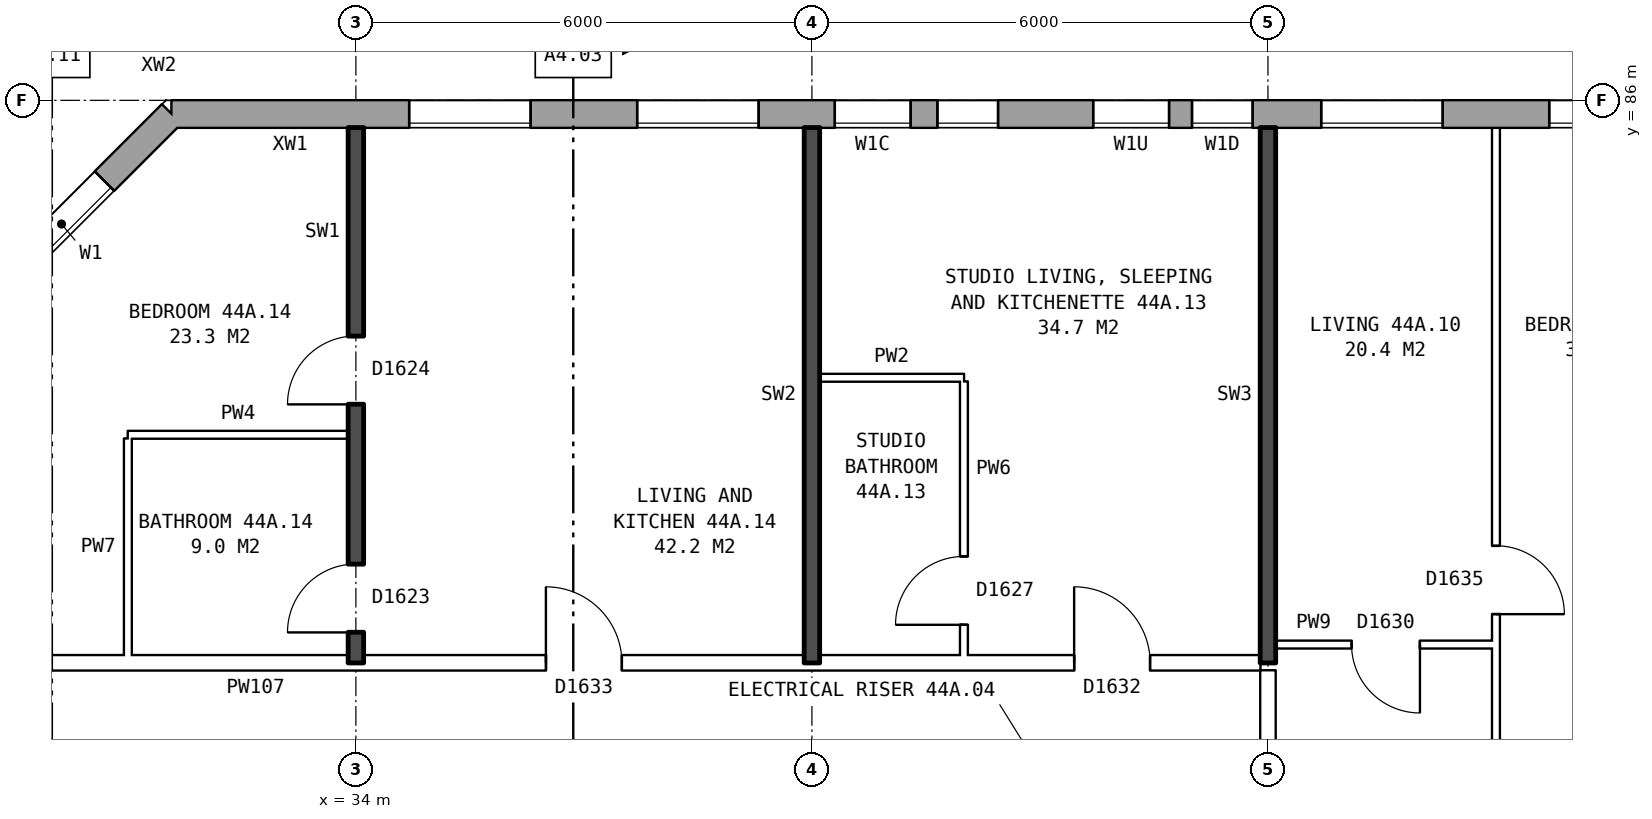
"""IFC4 building model, lengths in metres.
Left out: names, types, materials, properties, quantities, classifications, styles, units other than length and angle.
Written with IfcOpenShell. Run it as: python <this file> out.ifc"""

import sys

from ifc_helpers import new_model, si_unit, direction, frame, frame_2d, origin, place, context, subcontext, project, spatial, rectangle, extrude, element, fill, save


model = new_model("IFC4")
c1 = context("Model", 3, precision=1e-05, world=origin(), true_north=direction((0.0, 1.0)))
c2 = subcontext(c1, "Body", "Model", "MODEL_VIEW")
j1 = project(units=[si_unit("LENGTHUNIT", "METRE"), si_unit("PLANEANGLEUNIT", "RADIAN")], contexts=[c1])
p1 = place(None, origin())
s1 = spatial("IfcSite", under=j1, at=p1, CompositionType="ELEMENT")
p2 = place(p1, origin())
s2 = spatial("IfcBuilding", under=s1, at=p2, CompositionType="ELEMENT")
p3 = place(p2, frame((0.0, 0.0, 157.8)))
s3 = spatial("IfcBuildingStorey", under=s2, at=p3, CompositionType="ELEMENT", Elevation=157.8)
p4 = place(p3, frame((72.925, 85.82, 0.0), z_axis=(0.0, 0.0, 1.0), x_axis=(-1.0, 0.0, 0.0)))
e1 = element("IfcWall", 1, at=p4, inside=s3, PredefinedType="STANDARD", context=c2, shape_type="SweptSolid", body=[
    extrude(rectangle(XDim=41.351, YDim=0.36, at=frame_2d((20.675, 0.0))), origin(), (0.0, 0.0, 1.0), 2.85),
])
p5 = place(p4, frame((0.625, 0.0, 0.8)))
e2 = element("IfcOpeningElement", 2, at=p5, cuts=e1, PredefinedType="OPENING", context=c2, shape_type="SweptSolid", body=[
    extrude(rectangle(XDim=1.6, YDim=1.8, at=frame_2d((0.8, 0.9))), frame((0.0, 0.19, 0.0), z_axis=(0.0, -1.0, 0.0), x_axis=(1.0, 0.0, 0.0)), (0.0, 0.0, 1.0), 0.38),
])
p6 = place(p4, frame((3.625, 0.0, 0.8)))
e3 = element("IfcOpeningElement", 3, at=p6, cuts=e1, PredefinedType="OPENING", context=c2, shape_type="SweptSolid", body=[
    extrude(rectangle(XDim=1.6, YDim=1.8, at=frame_2d((0.8, 0.9))), frame((0.0, 0.19, 0.0), z_axis=(0.0, -1.0, 0.0), x_axis=(1.0, 0.0, 0.0)), (0.0, 0.0, 1.0), 0.38),
])
p7 = place(p4, frame((6.625, 0.0, 0.8)))
e4 = element("IfcOpeningElement", 4, at=p7, cuts=e1, PredefinedType="OPENING", context=c2, shape_type="SweptSolid", body=[
    extrude(rectangle(XDim=1.6, YDim=1.8, at=frame_2d((0.8, 0.9))), frame((0.0, 0.19, 0.0), z_axis=(0.0, -1.0, 0.0), x_axis=(1.0, 0.0, 0.0)), (0.0, 0.0, 1.0), 0.38),
])
p8 = place(p4, frame((9.125, 0.0, 0.8)))
e5 = element("IfcOpeningElement", 5, at=p8, cuts=e1, PredefinedType="OPENING", context=c2, shape_type="SweptSolid", body=[
    extrude(rectangle(XDim=0.6, YDim=1.8, at=frame_2d((0.3, 0.9))), frame((0.0, 0.19, 0.0), z_axis=(0.0, -1.0, 0.0), x_axis=(1.0, 0.0, 0.0)), (0.0, 0.0, 1.0), 0.38),
])
p9 = place(p4, frame((12.125, 0.0, 0.8)))
e6 = element("IfcOpeningElement", 6, at=p9, cuts=e1, PredefinedType="OPENING", context=c2, shape_type="SweptSolid", body=[
    extrude(rectangle(XDim=0.8, YDim=0.9, at=frame_2d((0.4, 0.45))), frame((0.0, 0.19, 0.0), z_axis=(0.0, -1.0, 0.0), x_axis=(1.0, 0.0, 0.0)), (0.0, 0.0, 1.0), 0.38),
])
p10 = place(p4, frame((15.625, 0.0, 0.8)))
e7 = element("IfcOpeningElement", 7, at=p10, cuts=e1, PredefinedType="OPENING", context=c2, shape_type="SweptSolid", body=[
    extrude(rectangle(XDim=1.6, YDim=1.8, at=frame_2d((0.8, 0.9))), frame((0.0, 0.19, 0.0), z_axis=(0.0, -1.0, 0.0), x_axis=(1.0, 0.0, 0.0)), (0.0, 0.0, 1.0), 0.38),
])
p11 = place(p4, frame((18.625, 0.0, 0.8)))
e8 = element("IfcOpeningElement", 8, at=p11, cuts=e1, PredefinedType="OPENING", context=c2, shape_type="SweptSolid", body=[
    extrude(rectangle(XDim=1.6, YDim=1.8, at=frame_2d((0.8, 0.9))), frame((0.0, 0.19, 0.0), z_axis=(0.0, -1.0, 0.0), x_axis=(1.0, 0.0, 0.0)), (0.0, 0.0, 1.0), 0.38),
])
p12 = place(p4, frame((21.625, 0.0, 0.8)))
e9 = element("IfcOpeningElement", 9, at=p12, cuts=e1, PredefinedType="OPENING", context=c2, shape_type="SweptSolid", body=[
    extrude(rectangle(XDim=1.6, YDim=1.8, at=frame_2d((0.8, 0.9))), frame((0.0, 0.19, 0.0), z_axis=(0.0, -1.0, 0.0), x_axis=(1.0, 0.0, 0.0)), (0.0, 0.0, 1.0), 0.38),
])
p13 = place(p4, frame((24.625, 0.0, 0.8)))
e10 = element("IfcOpeningElement", 10, at=p13, cuts=e1, PredefinedType="OPENING", context=c2, shape_type="SweptSolid", body=[
    extrude(rectangle(XDim=1.6, YDim=1.8, at=frame_2d((0.8, 0.9))), frame((0.0, 0.19, 0.0), z_axis=(0.0, -1.0, 0.0), x_axis=(1.0, 0.0, 0.0)), (0.0, 0.0, 1.0), 0.38),
])
p14 = place(p4, frame((27.125, 0.0, 0.8)))
e11 = element("IfcOpeningElement", 11, at=p14, cuts=e1, PredefinedType="OPENING", context=c2, shape_type="SweptSolid", body=[
    extrude(rectangle(XDim=0.8, YDim=1.8, at=frame_2d((0.4, 0.9))), frame((0.0, 0.19, 0.0), z_axis=(0.0, -1.0, 0.0), x_axis=(1.0, 0.0, 0.0)), (0.0, 0.0, 1.0), 0.38),
])
p15 = place(p4, frame((28.225, 0.0, 0.8)))
e12 = element("IfcOpeningElement", 12, at=p15, cuts=e1, PredefinedType="OPENING", context=c2, shape_type="SweptSolid", body=[
    extrude(rectangle(XDim=1.0, YDim=0.9, at=frame_2d((0.5, 0.45))), frame((0.0, 0.19, 0.0), z_axis=(0.0, -1.0, 0.0), x_axis=(1.0, 0.0, 0.0)), (0.0, 0.0, 1.0), 0.38),
])
p16 = place(p4, frame((33.625, 0.0, 0.8)))
e13 = element("IfcOpeningElement", 13, at=p16, cuts=e1, PredefinedType="OPENING", context=c2, shape_type="SweptSolid", body=[
    extrude(rectangle(XDim=1.6, YDim=1.8, at=frame_2d((0.8, 0.9))), frame((0.0, 0.19, 0.0), z_axis=(0.0, -1.0, 0.0), x_axis=(1.0, 0.0, 0.0)), (0.0, 0.0, 1.0), 0.38),
])
p17 = place(p4, frame((36.625, 0.0, 0.8)))
e14 = element("IfcOpeningElement", 14, at=p17, cuts=e1, PredefinedType="OPENING", context=c2, shape_type="SweptSolid", body=[
    extrude(rectangle(XDim=1.6, YDim=1.8, at=frame_2d((0.8, 0.9))), frame((0.0, 0.19, 0.0), z_axis=(0.0, -1.0, 0.0), x_axis=(1.0, 0.0, 0.0)), (0.0, 0.0, 1.0), 0.38),
])
p18 = place(p4, frame((10.025, 0.0, 1.7)))
e15 = element("IfcOpeningElement", 15, at=p18, cuts=e1, PredefinedType="OPENING", context=c2, shape_type="SweptSolid", body=[
    extrude(rectangle(XDim=0.8, YDim=0.9, at=frame_2d((0.4, 0.45))), frame((0.0, 0.19, 0.0), z_axis=(0.0, -1.0, 0.0), x_axis=(1.0, 0.0, 0.0)), (0.0, 0.0, 1.0), 0.38),
])
p19 = place(p4, frame((13.275, 0.0, 0.8)))
e16 = element("IfcOpeningElement", 16, at=p19, cuts=e1, PredefinedType="OPENING", context=c2, shape_type="SweptSolid", body=[
    extrude(rectangle(XDim=1.4, YDim=1.8, at=frame_2d((0.7, 0.9))), frame((0.0, 0.19, 0.0), z_axis=(0.0, -1.0, 0.0), x_axis=(1.0, 0.0, 0.0)), (0.0, 0.0, 1.0), 0.38),
])
p20 = place(p4, frame((30.475, 0.0, 1.7)))
e17 = element("IfcOpeningElement", 17, at=p20, cuts=e1, PredefinedType="OPENING", context=c2, shape_type="SweptSolid", body=[
    extrude(rectangle(XDim=0.8, YDim=0.9, at=frame_2d((0.4, 0.45))), frame((0.0, 0.19, 0.0), z_axis=(0.0, -1.0, 0.0), x_axis=(1.0, 0.0, 0.0)), (0.0, 0.0, 1.0), 0.38),
])
p21 = place(p4, frame((31.625, 0.0, 0.8)))
e18 = element("IfcOpeningElement", 18, at=p21, cuts=e1, PredefinedType="OPENING", context=c2, shape_type="SweptSolid", body=[
    extrude(rectangle(XDim=1.0, YDim=1.8, at=frame_2d((0.5, 0.9))), frame((0.0, 0.19, 0.0), z_axis=(0.0, -1.0, 0.0), x_axis=(1.0, 0.0, 0.0)), (0.0, 0.0, 1.0), 0.38),
])
p22 = place(p3, frame((31.575, 85.82, 0.0), z_axis=(0.0, 0.0, 1.0), x_axis=(-0.707106781187, -0.707106781187, 0.0)))
e19 = element("IfcWall", 19, at=p22, inside=s3, PredefinedType="STANDARD", context=c2, shape_type="SweptSolid", body=[
    extrude(rectangle(XDim=4.094, YDim=0.36, at=frame_2d((2.047, 0.0))), origin(), (0.0, 0.0, 1.0), 2.85),
])
p23 = place(p22, frame((1.247, 0.0, 0.8)))
e20 = element("IfcOpeningElement", 20, at=p23, cuts=e19, PredefinedType="OPENING", context=c2, shape_type="SweptSolid", body=[
    extrude(rectangle(XDim=1.6, YDim=1.8, at=frame_2d((0.8, 0.9))), frame((0.0, 0.19, 0.0), z_axis=(0.0, -1.0, 0.0), x_axis=(1.0, 0.0, 0.0)), (0.0, 0.0, 1.0), 0.38),
])
p24 = place(p3, frame((28.86, 78.6, 0.0), z_axis=(0.0, 0.0, 1.0), x_axis=(1.0, 0.0, 0.0)))
e21 = element("IfcWall", 21, at=p24, inside=s3, PredefinedType="PARTITIONING", context=c2, shape_type="SweptSolid", body=[
    extrude(rectangle(XDim=17.04, YDim=0.2, at=frame_2d((8.52, 0.0))), origin(), (0.0, 0.0, 1.0), 2.85),
])
p25 = place(p24, frame((14.59, 0.0, 0.0)))
e22 = element("IfcOpeningElement", 22, at=p25, cuts=e21, PredefinedType="OPENING", context=c2, shape_type="SweptSolid", body=[
    extrude(rectangle(XDim=1.0, YDim=2.1, at=frame_2d((0.5, 1.05))), frame((0.0, 0.11, 0.0), z_axis=(0.0, -1.0, 0.0), x_axis=(1.0, 0.0, 0.0)), (0.0, 0.0, 1.0), 0.22),
])
p26 = place(p24, frame((7.64, 0.0, 0.0)))
e23 = element("IfcOpeningElement", 23, at=p26, cuts=e21, PredefinedType="OPENING", context=c2, shape_type="SweptSolid", body=[
    extrude(rectangle(XDim=1.0, YDim=2.1, at=frame_2d((0.5, 1.05))), frame((0.0, 0.11, 0.0), z_axis=(0.0, -1.0, 0.0), x_axis=(1.0, 0.0, 0.0)), (0.0, 0.0, 1.0), 0.22),
])
p27 = place(p3, frame((46.1, 78.84, 0.0), z_axis=(0.0, 0.0, 1.0), x_axis=(1.0, 0.0, 0.0)))
e24 = element("IfcWall", 24, at=p27, inside=s3, PredefinedType="PARTITIONING", context=c2, shape_type="SweptSolid", body=[
    extrude(rectangle(XDim=2.9, YDim=0.1, at=frame_2d((1.45, 0.0))), origin(), (0.0, 0.0, 1.0), 2.85),
])
p28 = place(p27, frame((1.0, 0.0, 0.0)))
e25 = element("IfcOpeningElement", 25, at=p28, cuts=e24, PredefinedType="OPENING", context=c2, shape_type="SweptSolid", body=[
    extrude(rectangle(XDim=0.9, YDim=2.1, at=frame_2d((0.45, 1.05))), frame((0.0, 0.06, 0.0), z_axis=(0.0, -1.0, 0.0), x_axis=(1.0, 0.0, 0.0)), (0.0, 0.0, 1.0), 0.12),
])
p29 = place(p3, frame((31.0, 81.6, 0.0), z_axis=(0.0, 0.0, 1.0), x_axis=(1.0, 0.0, 0.0)))
e26 = element("IfcWall", 26, at=p29, inside=s3, PredefinedType="PARTITIONING", context=c2, shape_type="SweptSolid", body=[
    extrude(rectangle(XDim=2.9, YDim=0.1, at=frame_2d((1.45, 0.0))), origin(), (0.0, 0.0, 1.0), 2.85),
])
p30 = place(p3, frame((40.1, 82.35, 0.0), z_axis=(0.0, 0.0, 1.0), x_axis=(1.0, 0.0, 0.0)))
e27 = element("IfcWall", 27, at=p30, inside=s3, PredefinedType="PARTITIONING", context=c2, shape_type="SweptSolid", body=[
    extrude(rectangle(XDim=1.9, YDim=0.1, at=frame_2d((0.95, 0.0))), origin(), (0.0, 0.0, 1.0), 2.85),
])
p31 = place(p3, frame((31.0, 78.7, 0.0), z_axis=(0.0, 0.0, 1.0), x_axis=(0.0, 1.0, 0.0)))
e28 = element("IfcWall", 28, at=p31, inside=s3, PredefinedType="PARTITIONING", context=c2, shape_type="SweptSolid", body=[
    extrude(rectangle(XDim=2.85, YDim=0.1, at=frame_2d((1.425, 0.0))), origin(), (0.0, 0.0, 1.0), 2.85),
])
p32 = place(p3, frame((34.0, 78.6, 0.0), z_axis=(0.0, 0.0, 1.0), x_axis=(0.0, 1.0, 0.0)))
e29 = element("IfcWall", 29, at=p32, inside=s3, PredefinedType="SOLIDWALL", context=c2, shape_type="SweptSolid", body=[
    extrude(rectangle(XDim=7.04, YDim=0.2, at=frame_2d((3.52, 0.0))), origin(), (0.0, 0.0, 1.0), 2.85),
])
p33 = place(p32, frame((3.4, 0.0, 0.0)))
e30 = element("IfcOpeningElement", 30, at=p33, cuts=e29, PredefinedType="OPENING", context=c2, shape_type="SweptSolid", body=[
    extrude(rectangle(XDim=0.9, YDim=2.1, at=frame_2d((0.45, 1.05))), frame((0.0, 0.11, 0.0), z_axis=(0.0, -1.0, 0.0), x_axis=(1.0, 0.0, 0.0)), (0.0, 0.0, 1.0), 0.22),
])
p34 = place(p32, frame((0.4, 0.0, 0.0)))
e31 = element("IfcOpeningElement", 31, at=p34, cuts=e29, PredefinedType="OPENING", context=c2, shape_type="SweptSolid", body=[
    extrude(rectangle(XDim=0.9, YDim=2.1, at=frame_2d((0.45, 1.05))), frame((0.0, 0.11, 0.0), z_axis=(0.0, -1.0, 0.0), x_axis=(1.0, 0.0, 0.0)), (0.0, 0.0, 1.0), 0.22),
])
p35 = place(p3, frame((40.0, 78.6, 0.0), z_axis=(0.0, 0.0, 1.0), x_axis=(0.0, 1.0, 0.0)))
e32 = element("IfcWall", 32, at=p35, inside=s3, PredefinedType="SOLIDWALL", context=c2, shape_type="SweptSolid", body=[
    extrude(rectangle(XDim=7.04, YDim=0.2, at=frame_2d((3.52, 0.0))), origin(), (0.0, 0.0, 1.0), 2.85),
])
p36 = place(p3, frame((42.0, 78.7, 0.0), z_axis=(0.0, 0.0, 1.0), x_axis=(0.0, 1.0, 0.0)))
e33 = element("IfcWall", 33, at=p36, inside=s3, PredefinedType="PARTITIONING", context=c2, shape_type="SweptSolid", body=[
    extrude(rectangle(XDim=3.6, YDim=0.1, at=frame_2d((1.8, 0.0))), origin(), (0.0, 0.0, 1.0), 2.85),
])
p37 = place(p36, frame((0.4, 0.0, 0.0)))
e34 = element("IfcOpeningElement", 34, at=p37, cuts=e33, PredefinedType="OPENING", context=c2, shape_type="SweptSolid", body=[
    extrude(rectangle(XDim=0.9, YDim=2.1, at=frame_2d((0.45, 1.05))), frame((0.0, 0.06, 0.0), z_axis=(0.0, -1.0, 0.0), x_axis=(1.0, 0.0, 0.0)), (0.0, 0.0, 1.0), 0.12),
])
p38 = place(p3, frame((46.0, 76.3, 0.0), z_axis=(0.0, 0.0, 1.0), x_axis=(0.0, 1.0, 0.0)))
e35 = element("IfcWall", 35, at=p38, inside=s3, PredefinedType="PARTITIONING", context=c2, shape_type="SweptSolid", body=[
    extrude(rectangle(XDim=2.2, YDim=0.2, at=frame_2d((1.1, 0.0))), origin(), (0.0, 0.0, 1.0), 2.85),
])
p39 = place(p3, frame((46.0, 78.6, 0.0), z_axis=(0.0, 0.0, 1.0), x_axis=(0.0, 1.0, 0.0)))
e36 = element("IfcWall", 36, at=p39, inside=s3, PredefinedType="SOLIDWALL", context=c2, shape_type="SweptSolid", body=[
    extrude(rectangle(XDim=7.04, YDim=0.2, at=frame_2d((3.52, 0.0))), origin(), (0.0, 0.0, 1.0), 2.85),
])
p40 = place(p3, frame((49.0, 71.3, 0.0), z_axis=(0.0, 0.0, 1.0), x_axis=(0.0, 1.0, 0.0)))
e37 = element("IfcWall", 37, at=p40, inside=s3, PredefinedType="PARTITIONING", context=c2, shape_type="SweptSolid", body=[
    extrude(rectangle(XDim=14.34, YDim=0.1, at=frame_2d((7.17, 0.0))), origin(), (0.0, 0.0, 1.0), 2.85),
])
p41 = place(p40, frame((7.94, 0.0, 0.0)))
e38 = element("IfcOpeningElement", 38, at=p41, cuts=e37, PredefinedType="OPENING", context=c2, shape_type="SweptSolid", body=[
    extrude(rectangle(XDim=0.9, YDim=2.1, at=frame_2d((0.45, 1.05))), frame((0.0, 0.06, 0.0), z_axis=(0.0, -1.0, 0.0), x_axis=(1.0, 0.0, 0.0)), (0.0, 0.0, 1.0), 0.12),
])
p42 = place(p40, frame((0.4, 0.0, 0.0)))
e39 = element("IfcOpeningElement", 39, at=p42, cuts=e37, PredefinedType="OPENING", context=c2, shape_type="SweptSolid", body=[
    extrude(rectangle(XDim=0.9, YDim=2.1, at=frame_2d((0.45, 1.05))), frame((0.0, 0.06, 0.0), z_axis=(0.0, -1.0, 0.0), x_axis=(1.0, 0.0, 0.0)), (0.0, 0.0, 1.0), 0.12),
])
p43 = place(p12, origin())
e40 = element("IfcWindow", 40, at=p43, inside=s3, PartitioningType="SINGLE_PANEL", PredefinedType="WINDOW", context=c2, shape_type="SweptSolid", body=[
    extrude(rectangle(XDim=1.6, YDim=1.8, at=frame_2d((0.8, 0.9))), frame((0.0, 0.15, 0.0), z_axis=(0.0, -1.0, 0.0), x_axis=(1.0, 0.0, 0.0)), (0.0, 0.0, 1.0), 0.06),
])
fill(e9, e40)
p44 = place(p13, origin())
e41 = element("IfcWindow", 41, at=p44, inside=s3, PartitioningType="SINGLE_PANEL", PredefinedType="WINDOW", context=c2, shape_type="SweptSolid", body=[
    extrude(rectangle(XDim=1.6, YDim=1.8, at=frame_2d((0.8, 0.9))), frame((0.0, 0.15, 0.0), z_axis=(0.0, -1.0, 0.0), x_axis=(1.0, 0.0, 0.0)), (0.0, 0.0, 1.0), 0.06),
])
fill(e10, e41)
p45 = place(p14, origin())
e42 = element("IfcWindow", 42, at=p45, inside=s3, PartitioningType="SINGLE_PANEL", PredefinedType="WINDOW", context=c2, shape_type="SweptSolid", body=[
    extrude(rectangle(XDim=0.8, YDim=1.8, at=frame_2d((0.4, 0.9))), frame((0.0, 0.15, 0.0), z_axis=(0.0, -1.0, 0.0), x_axis=(1.0, 0.0, 0.0)), (0.0, 0.0, 1.0), 0.06),
])
fill(e11, e42)
p46 = place(p15, origin())
e43 = element("IfcWindow", 43, at=p46, inside=s3, PartitioningType="SINGLE_PANEL", PredefinedType="WINDOW", context=c2, shape_type="SweptSolid", body=[
    extrude(rectangle(XDim=1.0, YDim=0.9, at=frame_2d((0.5, 0.45))), frame((0.0, 0.15, 0.0), z_axis=(0.0, -1.0, 0.0), x_axis=(1.0, 0.0, 0.0)), (0.0, 0.0, 1.0), 0.06),
])
fill(e12, e43)
p47 = place(p16, origin())
e44 = element("IfcWindow", 44, at=p47, inside=s3, PartitioningType="SINGLE_PANEL", PredefinedType="WINDOW", context=c2, shape_type="SweptSolid", body=[
    extrude(rectangle(XDim=1.6, YDim=1.8, at=frame_2d((0.8, 0.9))), frame((0.0, 0.15, 0.0), z_axis=(0.0, -1.0, 0.0), x_axis=(1.0, 0.0, 0.0)), (0.0, 0.0, 1.0), 0.06),
])
fill(e13, e44)
p48 = place(p17, origin())
e45 = element("IfcWindow", 45, at=p48, inside=s3, PartitioningType="SINGLE_PANEL", PredefinedType="WINDOW", context=c2, shape_type="SweptSolid", body=[
    extrude(rectangle(XDim=1.6, YDim=1.8, at=frame_2d((0.8, 0.9))), frame((0.0, 0.15, 0.0), z_axis=(0.0, -1.0, 0.0), x_axis=(1.0, 0.0, 0.0)), (0.0, 0.0, 1.0), 0.06),
])
fill(e14, e45)
p49 = place(p23, origin())
e46 = element("IfcWindow", 46, at=p49, inside=s3, PartitioningType="SINGLE_PANEL", PredefinedType="WINDOW", context=c2, shape_type="SweptSolid", body=[
    extrude(rectangle(XDim=1.6, YDim=1.8, at=frame_2d((0.8, 0.9))), frame((0.0, 0.15, 0.0), z_axis=(0.0, -1.0, 0.0), x_axis=(1.0, 0.0, 0.0)), (0.0, 0.0, 1.0), 0.06),
])
fill(e20, e46)
p50 = place(p41, frame((0.9, 0.0, 0.0), z_axis=(0.0, 0.0, 1.0), x_axis=(-1.0, 0.0, 0.0)))
e47 = element("IfcDoor", 47, at=p50, inside=s3, OperationType="SINGLE_SWING_RIGHT", PredefinedType="DOOR", context=c2, shape_type="SweptSolid", body=[
    extrude(rectangle(XDim=0.9, YDim=2.1, at=frame_2d((0.45, 1.05))), frame((0.0, 0.025, 0.0), z_axis=(0.0, -1.0, 0.0), x_axis=(1.0, 0.0, 0.0)), (0.0, 0.0, 1.0), 0.05),
])
fill(e38, e47)
p51 = place(p28, frame((0.9, 0.0, 0.0), z_axis=(0.0, 0.0, 1.0), x_axis=(-1.0, 0.0, 0.0)))
e48 = element("IfcDoor", 48, at=p51, inside=s3, OperationType="SINGLE_SWING_LEFT", PredefinedType="DOOR", context=c2, shape_type="SweptSolid", body=[
    extrude(rectangle(XDim=0.9, YDim=2.1, at=frame_2d((0.45, 1.05))), frame((0.0, 0.025, 0.0), z_axis=(0.0, -1.0, 0.0), x_axis=(1.0, 0.0, 0.0)), (0.0, 0.0, 1.0), 0.05),
])
fill(e25, e48)
p52 = place(p25, origin())
e49 = element("IfcDoor", 49, at=p52, inside=s3, OperationType="SINGLE_SWING_LEFT", PredefinedType="DOOR", context=c2, shape_type="SweptSolid", body=[
    extrude(rectangle(XDim=1.0, YDim=2.1, at=frame_2d((0.5, 1.05))), frame((0.0, 0.025, 0.0), z_axis=(0.0, -1.0, 0.0), x_axis=(1.0, 0.0, 0.0)), (0.0, 0.0, 1.0), 0.05),
])
fill(e22, e49)
p53 = place(p37, origin())
e50 = element("IfcDoor", 50, at=p53, inside=s3, OperationType="SINGLE_SWING_LEFT", PredefinedType="DOOR", context=c2, shape_type="SweptSolid", body=[
    extrude(rectangle(XDim=0.9, YDim=2.1, at=frame_2d((0.45, 1.05))), frame((0.0, 0.025, 0.0), z_axis=(0.0, -1.0, 0.0), x_axis=(1.0, 0.0, 0.0)), (0.0, 0.0, 1.0), 0.05),
])
fill(e34, e50)
p54 = place(p33, origin())
e51 = element("IfcDoor", 51, at=p54, inside=s3, OperationType="SINGLE_SWING_LEFT", PredefinedType="DOOR", context=c2, shape_type="SweptSolid", body=[
    extrude(rectangle(XDim=0.9, YDim=2.1, at=frame_2d((0.45, 1.05))), frame((0.0, 0.025, 0.0), z_axis=(0.0, -1.0, 0.0), x_axis=(1.0, 0.0, 0.0)), (0.0, 0.0, 1.0), 0.05),
])
fill(e30, e51)
p55 = place(p26, origin())
e52 = element("IfcDoor", 52, at=p55, inside=s3, OperationType="SINGLE_SWING_LEFT", PredefinedType="DOOR", context=c2, shape_type="SweptSolid", body=[
    extrude(rectangle(XDim=1.0, YDim=2.1, at=frame_2d((0.5, 1.05))), frame((0.0, 0.025, 0.0), z_axis=(0.0, -1.0, 0.0), x_axis=(1.0, 0.0, 0.0)), (0.0, 0.0, 1.0), 0.05),
])
fill(e23, e52)
p56 = place(p34, origin())
e53 = element("IfcDoor", 53, at=p56, inside=s3, OperationType="SINGLE_SWING_LEFT", PredefinedType="DOOR", context=c2, shape_type="SweptSolid", body=[
    extrude(rectangle(XDim=0.9, YDim=2.1, at=frame_2d((0.45, 1.05))), frame((0.0, 0.025, 0.0), z_axis=(0.0, -1.0, 0.0), x_axis=(1.0, 0.0, 0.0)), (0.0, 0.0, 1.0), 0.05),
])
fill(e31, e53)
p57 = place(p20, origin())
e54 = element("IfcWindow", 54, at=p57, inside=s3, PartitioningType="SINGLE_PANEL", PredefinedType="WINDOW", context=c2, shape_type="SweptSolid", body=[
    extrude(rectangle(XDim=0.8, YDim=0.9, at=frame_2d((0.4, 0.45))), frame((0.0, 0.15, 0.0), z_axis=(0.0, -1.0, 0.0), x_axis=(1.0, 0.0, 0.0)), (0.0, 0.0, 1.0), 0.06),
])
fill(e17, e54)
p58 = place(p21, origin())
e55 = element("IfcWindow", 55, at=p58, inside=s3, PartitioningType="SINGLE_PANEL", PredefinedType="WINDOW", context=c2, shape_type="SweptSolid", body=[
    extrude(rectangle(XDim=1.0, YDim=1.8, at=frame_2d((0.5, 0.9))), frame((0.0, 0.15, 0.0), z_axis=(0.0, -1.0, 0.0), x_axis=(1.0, 0.0, 0.0)), (0.0, 0.0, 1.0), 0.06),
])
fill(e18, e55)
save(model, sys.argv[1])
